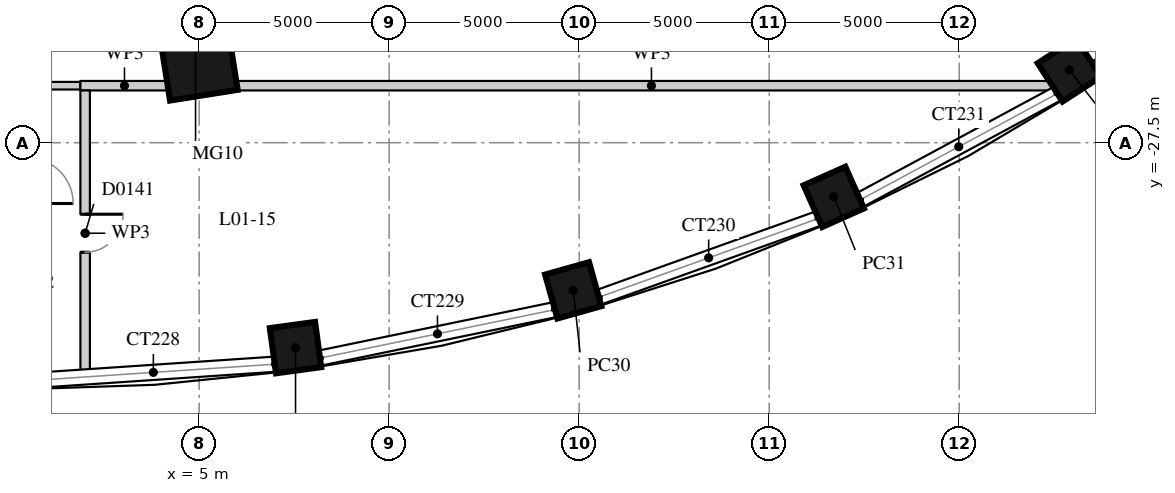
"""IFC4 building model, lengths in metres.
Left out: names, types, materials, properties, quantities, classifications, styles, units other than length and angle.
Written with IfcOpenShell. Run it as: python <this file> out.ifc"""

import sys

from ifc_helpers import new_model, si_unit, direction, frame, frame_2d, origin, origin_2d, place, context, subcontext, project, spatial, rectangle, extrude, element, fill, save


model = new_model("IFC4")
c1 = context("Model", 3, precision=1e-05, world=origin(), true_north=direction((0.0, 1.0)))
c2 = subcontext(c1, "Body", "Model", "MODEL_VIEW")
j1 = project(units=[si_unit("LENGTHUNIT", "METRE"), si_unit("PLANEANGLEUNIT", "RADIAN")], contexts=[c1])
p1 = place(None, origin())
s1 = spatial("IfcSite", under=j1, at=p1, CompositionType="ELEMENT")
p2 = place(p1, origin())
s2 = spatial("IfcBuilding", under=s1, at=p2, CompositionType="ELEMENT")
p3 = place(p2, frame((0.0, 0.0, 7.5)))
s3 = spatial("IfcBuildingStorey", under=s2, at=p3, CompositionType="ELEMENT", Elevation=7.5)
p4 = place(p3, frame((4.906, -24.866, 0.0), z_axis=(0.0, 0.0, 1.0), x_axis=(0.15614709407, -0.987733812833, 0.0)))
e1 = element("IfcColumn", 1, at=p4, inside=s3, PredefinedType="COLUMN", context=c2, shape_type="SweptSolid", body=[
    extrude(rectangle(XDim=2.8, YDim=1.8, at=origin_2d()), origin(), (0.0, 0.0, 1.0), 5.0),
])
for number, where, z_axis, x_axis in (
    (2, (7.536, -32.893, 0.0), (0.0, 0.0, 1.0), (0.135, -0.991, 0.0)),
    (3, (14.844, -31.386, 0.0), (0.0, 0.0, 1.0), (0.271, -0.963, 0.0)),
    (4, (21.7, -28.925, 0.0), (0.0, 0.0, 1.0), (0.407, -0.913, 0.0)),
    (5, (27.897, -25.586, 0.0), (0.0, 0.0, 1.0), (0.544, -0.839, 0.0)),
):
    element("IfcColumn", number, at=place(p3, frame(where, z_axis=z_axis, x_axis=x_axis)), inside=s3, PredefinedType="COLUMN", context=c2, shape_type="SweptSolid", body=[
        extrude(rectangle(XDim=1.2, YDim=1.2, at=origin_2d()), origin(), (0.0, 0.0, 1.0), 5.0),
    ])
p5 = place(p3, frame((-14.4, -26.0, 0.0), z_axis=(0.0, 0.0, 1.0), x_axis=(1.0, 0.0, 0.0)))
e6 = element("IfcWall", 6, at=p5, inside=s3, PredefinedType="PARTITIONING", context=c2, shape_type="SweptSolid", body=[
    extrude(rectangle(XDim=16.275, YDim=0.2, at=frame_2d((8.137, 0.0))), origin(), (0.0, 0.0, 1.0), 3.69),
])
p6 = place(p5, frame((1.487, 0.0, 0.0)))
e7 = element("IfcOpeningElement", 7, at=p6, cuts=e6, PredefinedType="OPENING", context=c2, shape_type="SweptSolid", body=[
    extrude(rectangle(XDim=1.8, YDim=2.1, at=frame_2d((0.9, 1.05))), frame((0.0, 0.11, 0.0), z_axis=(0.0, -1.0, 0.0), x_axis=(1.0, 0.0, 0.0)), (0.0, 0.0, 1.0), 0.22),
])
p7 = place(p3, frame((1.875, -26.0, 0.0), z_axis=(0.0, 0.0, 1.0), x_axis=(1.0, 0.0, 0.0)))
e8 = element("IfcWall", 8, at=p7, inside=s3, PredefinedType="PARTITIONING", context=c2, shape_type="SweptSolid", body=[
    extrude(rectangle(XDim=2.32, YDim=0.25, at=frame_2d((1.16, 0.0))), origin(), (0.0, 0.0, 1.0), 4.59),
])
p8 = place(p3, frame((5.897, -26.0, 0.0), z_axis=(0.0, 0.0, 1.0), x_axis=(1.0, 0.0, 0.0)))
e9 = element("IfcWall", 9, at=p8, inside=s3, PredefinedType="PARTITIONING", context=c2, shape_type="SweptSolid", body=[
    extrude(rectangle(XDim=22.009, YDim=0.25, at=frame_2d((11.004, 0.0))), origin(), (0.0, 0.0, 1.0), 4.59),
])
p9 = place(p3, frame((2.0, -33.639, 0.0), z_axis=(0.0, 0.0, 1.0), x_axis=(0.0, 1.0, 0.0)))
e10 = element("IfcWall", 10, at=p9, inside=s3, PredefinedType="PARTITIONING", context=c2, shape_type="SweptSolid", body=[
    extrude(rectangle(XDim=7.514, YDim=0.25, at=frame_2d((3.757, 0.0))), origin(), (0.0, 0.0, 1.0), 4.59),
])
p10 = place(p9, frame((3.257, 0.0, 0.0)))
e11 = element("IfcOpeningElement", 11, at=p10, cuts=e10, PredefinedType="OPENING", context=c2, shape_type="SweptSolid", body=[
    extrude(rectangle(XDim=1.0, YDim=2.1, at=frame_2d((0.5, 1.05))), frame((0.0, 0.135, 0.0), z_axis=(0.0, -1.0, 0.0), x_axis=(1.0, 0.0, 0.0)), (0.0, 0.0, 1.0), 0.27),
])
p11 = place(p3, frame((28.0, -25.932, 0.0), z_axis=(0.0, 0.0, 1.0), x_axis=(0.0, 1.0, 0.0)))
e12 = element("IfcWall", 12, at=p11, inside=s3, PredefinedType="PARTITIONING", context=c2, shape_type="SweptSolid", body=[
    extrude(rectangle(XDim=13.832, YDim=0.2, at=frame_2d((6.916, 0.0))), origin(), (0.0, 0.0, 1.0), 4.59),
])
p12 = place(p11, frame((6.416, 0.0, 0.0)))
e13 = element("IfcOpeningElement", 13, at=p12, cuts=e12, PredefinedType="OPENING", context=c2, shape_type="SweptSolid", body=[
    extrude(rectangle(XDim=1.0, YDim=2.1, at=frame_2d((0.5, 1.05))), frame((0.0, 0.11, 0.0), z_axis=(0.0, -1.0, 0.0), x_axis=(1.0, 0.0, 0.0)), (0.0, 0.0, 1.0), 0.22),
])
p13 = place(p10, origin())
e14 = element("IfcDoor", 14, at=p13, inside=s3, OperationType="SINGLE_SWING_LEFT", PredefinedType="DOOR", context=c2, shape_type="SweptSolid", body=[
    extrude(rectangle(XDim=1.0, YDim=2.1, at=frame_2d((0.5, 1.05))), frame((0.0, 0.025, 0.0), z_axis=(0.0, -1.0, 0.0), x_axis=(1.0, 0.0, 0.0)), (0.0, 0.0, 1.0), 0.05),
])
fill(e11, e14)
save(model, sys.argv[1])
